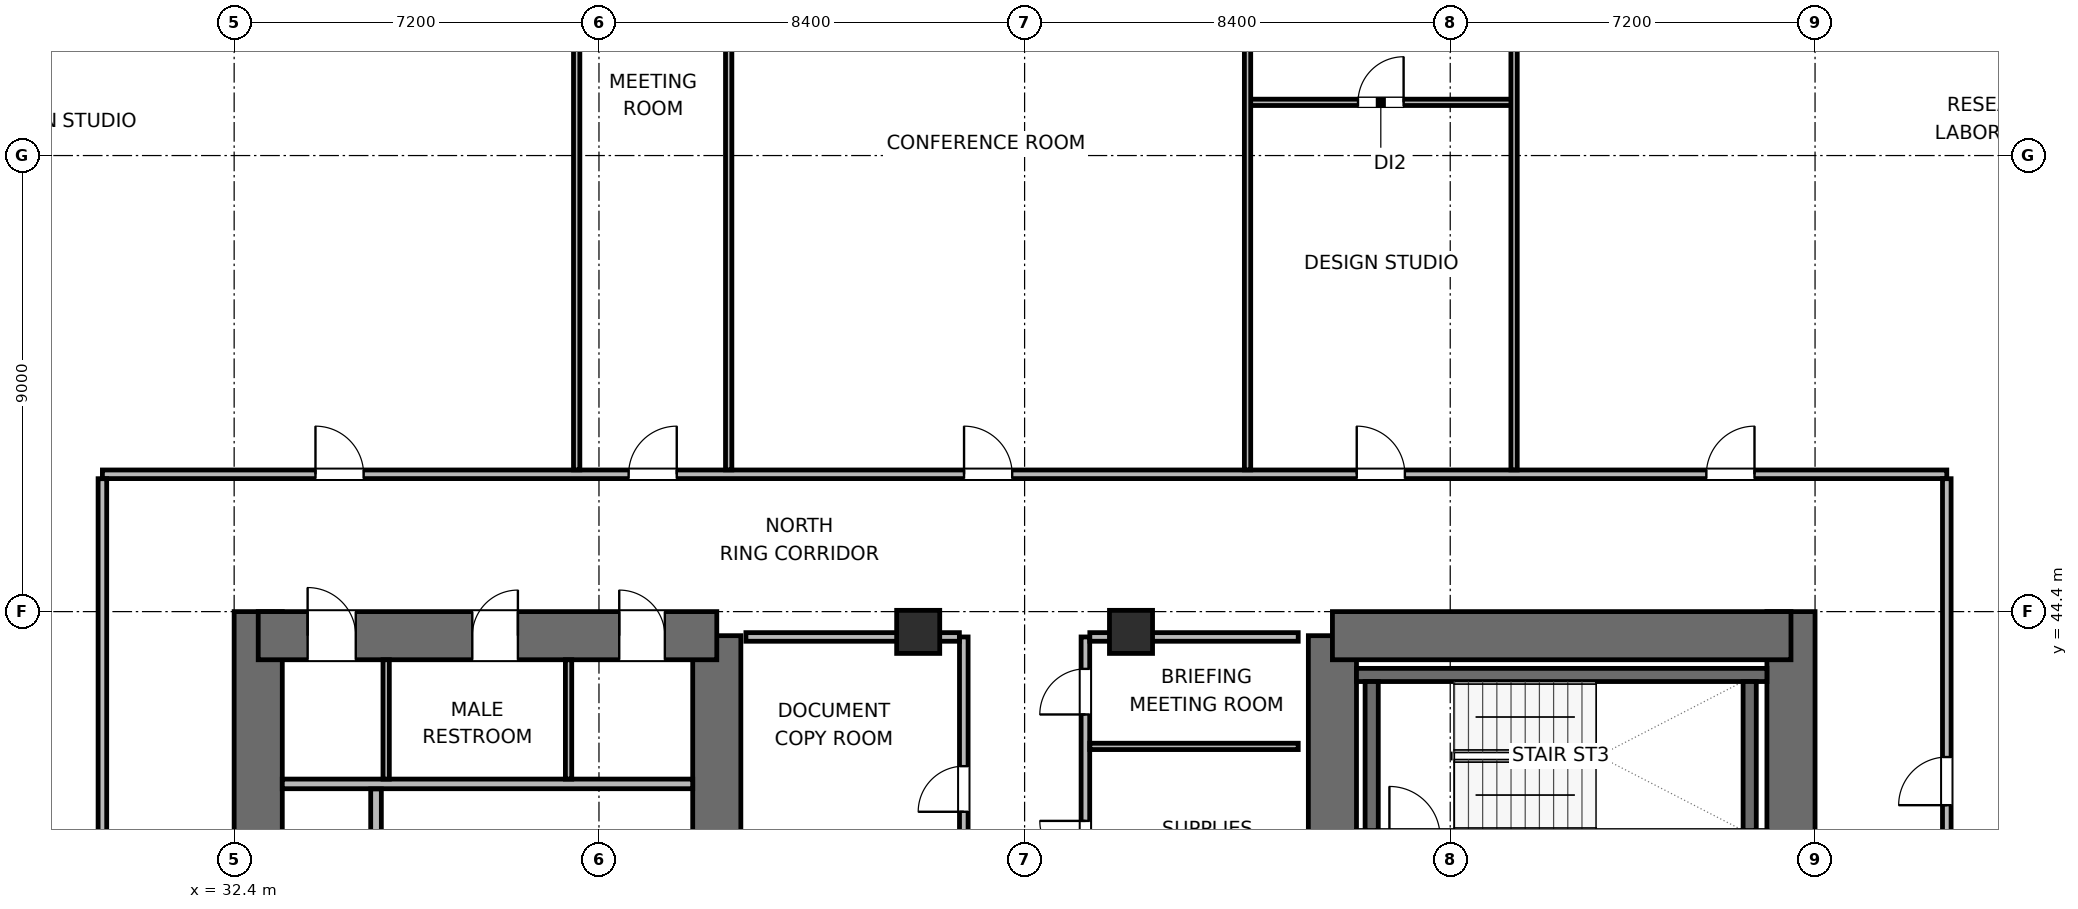
"""IFC4 building model, lengths in metres.
Left out: names, types, materials, properties, quantities, classifications, styles, units other than length and angle.
Written with IfcOpenShell. Run it as: python <this file> out.ifc"""

import sys

from ifc_helpers import new_model, si_unit, direction, frame, frame_2d, origin, origin_2d, place, context, subcontext, project, spatial, rectangle, extrude, element, fill, save


model = new_model("IFC4")
c1 = context("Model", 3, precision=1e-05, world=origin(), true_north=direction((0.0, 1.0)))
c2 = subcontext(c1, "Body", "Model", "MODEL_VIEW")
j1 = project(units=[si_unit("LENGTHUNIT", "METRE"), si_unit("PLANEANGLEUNIT", "RADIAN")], contexts=[c1])
p1 = place(None, origin())
s1 = spatial("IfcSite", under=j1, at=p1, CompositionType="ELEMENT")
p2 = place(p1, origin())
s2 = spatial("IfcBuilding", under=s1, at=p2, CompositionType="ELEMENT")
p3 = place(p2, frame((0.0, 0.0, 48.9)))
s3 = spatial("IfcBuildingStorey", under=s2, at=p3, CompositionType="ELEMENT", Elevation=48.9)
p4 = place(p3, frame((32.875, 27.6, 0.0), z_axis=(0.0, 0.0, 1.0), x_axis=(0.0, 1.0, 0.0)))
e1 = element("IfcWall", 1, at=p4, inside=s3, PredefinedType="SHEAR", context=c2, shape_type="SweptSolid", body=[
    extrude(rectangle(XDim=16.8, YDim=0.95, at=frame_2d((8.4, 0.0))), origin(), (0.0, 0.0, 1.0), 3.9),
])
p5 = place(p3, frame((41.925, 37.8, 0.0), z_axis=(0.0, 0.0, 1.0), x_axis=(0.0, 1.0, 0.0)))
e2 = element("IfcWall", 2, at=p5, inside=s3, PredefinedType="SHEAR", context=c2, shape_type="SweptSolid", body=[
    extrude(rectangle(XDim=6.125, YDim=0.95, at=frame_2d((3.062, 0.0))), origin(), (0.0, 0.0, 1.0), 3.9),
])
p6 = place(p3, frame((32.875, 43.925, 0.0), z_axis=(0.0, 0.0, 1.0), x_axis=(1.0, 0.0, 0.0)))
e3 = element("IfcWall", 3, at=p6, inside=s3, PredefinedType="SHEAR", context=c2, shape_type="SweptSolid", body=[
    extrude(rectangle(XDim=9.05, YDim=0.95, at=frame_2d((4.525, 0.0))), origin(), (0.0, 0.0, 1.0), 3.9),
])
p7 = place(p6, frame((0.975, 0.0, 0.0)))
e4 = element("IfcOpeningElement", 4, at=p7, cuts=e3, PredefinedType="OPENING", context=c2, shape_type="SweptSolid", body=[
    extrude(rectangle(XDim=0.95, YDim=2.04, at=frame_2d((0.475, 1.02))), frame((0.0, 0.485, 0.0), z_axis=(0.0, -1.0, 0.0), x_axis=(1.0, 0.0, 0.0)), (0.0, 0.0, 1.0), 0.97),
])
p8 = place(p6, frame((4.225, 0.0, 0.0)))
e5 = element("IfcOpeningElement", 5, at=p8, cuts=e3, PredefinedType="OPENING", context=c2, shape_type="SweptSolid", body=[
    extrude(rectangle(XDim=0.9, YDim=2.02, at=frame_2d((0.45, 1.01))), frame((0.0, 0.485, 0.0), z_axis=(0.0, -1.0, 0.0), x_axis=(1.0, 0.0, 0.0)), (0.0, 0.0, 1.0), 0.97),
])
p9 = place(p6, frame((7.125, 0.0, 0.0)))
e6 = element("IfcOpeningElement", 6, at=p9, cuts=e3, PredefinedType="OPENING", context=c2, shape_type="SweptSolid", body=[
    extrude(rectangle(XDim=0.9, YDim=2.02, at=frame_2d((0.45, 1.01))), frame((0.0, 0.485, 0.0), z_axis=(0.0, -1.0, 0.0), x_axis=(1.0, 0.0, 0.0)), (0.0, 0.0, 1.0), 0.97),
])
p10 = place(p3, frame((54.075, 38.0, 0.0), z_axis=(0.0, 0.0, 1.0), x_axis=(0.0, 1.0, 0.0)))
e7 = element("IfcWall", 7, at=p10, inside=s3, PredefinedType="SHEAR", context=c2, shape_type="SweptSolid", body=[
    extrude(rectangle(XDim=5.925, YDim=0.95, at=frame_2d((2.962, 0.0))), origin(), (0.0, 0.0, 1.0), 3.9),
])
p11 = place(p3, frame((63.125, 27.6, 0.0), z_axis=(0.0, 0.0, 1.0), x_axis=(0.0, 1.0, 0.0)))
e8 = element("IfcWall", 8, at=p11, inside=s3, PredefinedType="SHEAR", context=c2, shape_type="SweptSolid", body=[
    extrude(rectangle(XDim=16.8, YDim=0.95, at=frame_2d((8.4, 0.0))), origin(), (0.0, 0.0, 1.0), 3.9),
])
p12 = place(p3, frame((54.075, 43.925, 0.0), z_axis=(0.0, 0.0, 1.0), x_axis=(1.0, 0.0, 0.0)))
e9 = element("IfcWall", 9, at=p12, inside=s3, PredefinedType="SHEAR", context=c2, shape_type="SweptSolid", body=[
    extrude(rectangle(XDim=9.05, YDim=0.95, at=frame_2d((4.525, 0.0))), origin(), (0.0, 0.0, 1.0), 3.9),
])
p13 = place(p3, frame((54.55, 43.15, 0.0), z_axis=(0.0, 0.0, 1.0), x_axis=(1.0, 0.0, 0.0)))
e10 = element("IfcWall", 10, at=p13, inside=s3, PredefinedType="SHEAR", context=c2, shape_type="SweptSolid", body=[
    extrude(rectangle(XDim=8.1, YDim=0.26, at=frame_2d((4.05, 0.0))), origin(), (0.0, 0.0, 1.0), 3.9),
])
for number, where, z_axis, x_axis in (
    (11, (54.85, 40.08, 0.0), (0.0, 0.0, 1.0), (0.0, 1.0, 0.0)),
    (12, (62.31, 40.08, 0.0), (0.0, 0.0, 1.0), (0.0, 1.0, 0.0)),
):
    element("IfcWall", number, at=place(p3, frame(where, z_axis=z_axis, x_axis=x_axis)), inside=s3, PredefinedType="SHEAR", context=c2, shape_type="SweptSolid", body=[
        extrude(rectangle(XDim=2.94, YDim=0.26, at=frame_2d((1.47, 0.0))), origin(), (0.0, 0.0, 1.0), 3.9),
    ])
for number, where, z_axis, x_axis in (
    (13, (45.9, 44.0, 0.0), (0.0, 0.0, 1.0), (1.0, 0.0, 0.0)),
    (14, (50.1, 44.0, 0.0), (0.0, 0.0, 1.0), (1.0, 0.0, 0.0)),
):
    element("IfcColumn", number, at=place(p3, frame(where, z_axis=z_axis, x_axis=x_axis)), inside=s3, PredefinedType="COLUMN", context=c2, shape_type="SweptSolid", body=[
        extrude(rectangle(XDim=0.85, YDim=0.85, at=origin_2d()), origin(), (0.0, 0.0, 1.0), 3.9),
    ])
p14 = place(p3, frame((33.35, 41.0, 0.0), z_axis=(0.0, 0.0, 1.0), x_axis=(1.0, 0.0, 0.0)))
e15 = element("IfcWall", 15, at=p14, inside=s3, PredefinedType="PLUMBINGWALL", context=c2, shape_type="SweptSolid", body=[
    extrude(rectangle(XDim=8.1, YDim=0.19, at=frame_2d((4.05, 0.0))), origin(), (0.0, 0.0, 1.0), 3.64),
])
for number, where, z_axis, x_axis in (
    (16, (35.4, 41.095, 0.0), (0.0, 0.0, 1.0), (0.0, 1.0, 0.0)),
    (17, (39.0, 41.095, 0.0), (0.0, 0.0, 1.0), (0.0, 1.0, 0.0)),
):
    element("IfcWall", number, at=place(p3, frame(where, z_axis=z_axis, x_axis=x_axis)), inside=s3, PredefinedType="PARTITIONING", context=c2, shape_type="SweptSolid", body=[
        extrude(rectangle(XDim=2.355, YDim=0.125, at=frame_2d((1.177, 0.0))), origin(), (0.0, 0.0, 1.0), 3.64),
    ])
p15 = place(p3, frame((35.2, 39.58, 0.0), z_axis=(0.0, 0.0, 1.0), x_axis=(0.0, 1.0, 0.0)))
e18 = element("IfcWall", 18, at=p15, inside=s3, PredefinedType="PARTITIONING", context=c2, shape_type="SweptSolid", body=[
    extrude(rectangle(XDim=1.32, YDim=0.21, at=frame_2d((0.66, 0.0))), origin(), (0.0, 0.0, 1.0), 3.64),
])
p16 = place(p3, frame((46.8, 37.9, 0.0), z_axis=(0.0, 0.0, 1.0), x_axis=(0.0, 1.0, 0.0)))
e19 = element("IfcWall", 19, at=p16, inside=s3, PredefinedType="PARTITIONING", context=c2, shape_type="SweptSolid", body=[
    extrude(rectangle(XDim=6.0, YDim=0.17, at=frame_2d((3.0, 0.0))), origin(), (0.0, 0.0, 1.0), 3.64),
])
p17 = place(p16, frame((2.55, 0.0, 0.0)))
e20 = element("IfcOpeningElement", 20, at=p17, cuts=e19, PredefinedType="OPENING", context=c2, shape_type="SweptSolid", body=[
    extrude(rectangle(XDim=0.9, YDim=2.02, at=frame_2d((0.45, 1.01))), frame((0.0, 0.095, 0.0), z_axis=(0.0, -1.0, 0.0), x_axis=(1.0, 0.0, 0.0)), (0.0, 0.0, 1.0), 0.19),
])
p18 = place(p3, frame((42.5, 43.9, 0.0), z_axis=(0.0, 0.0, 1.0), x_axis=(1.0, 0.0, 0.0)))
e21 = element("IfcWall", 21, at=p18, inside=s3, PredefinedType="PARTITIONING", context=c2, shape_type="SweptSolid", body=[
    extrude(rectangle(XDim=4.213, YDim=0.17, at=frame_2d((2.106, 0.0))), origin(), (0.0, 0.0, 1.0), 2.525),
])
p19 = place(p3, frame((49.2, 37.9, 0.0), z_axis=(0.0, 0.0, 1.0), x_axis=(0.0, 1.0, 0.0)))
e22 = element("IfcWall", 22, at=p19, inside=s3, PredefinedType="PARTITIONING", context=c2, shape_type="SweptSolid", body=[
    extrude(rectangle(XDim=6.0, YDim=0.17, at=frame_2d((3.0, 0.0))), origin(), (0.0, 0.0, 1.0), 3.64),
])
p20 = place(p19, frame((1.47, 0.0, 0.0)))
e23 = element("IfcOpeningElement", 23, at=p20, cuts=e22, PredefinedType="OPENING", context=c2, shape_type="SweptSolid", body=[
    extrude(rectangle(XDim=0.9, YDim=2.02, at=frame_2d((0.45, 1.01))), frame((0.0, 0.095, 0.0), z_axis=(0.0, -1.0, 0.0), x_axis=(1.0, 0.0, 0.0)), (0.0, 0.0, 1.0), 0.19),
])
p21 = place(p19, frame((4.47, 0.0, 0.0)))
e24 = element("IfcOpeningElement", 24, at=p21, cuts=e22, PredefinedType="OPENING", context=c2, shape_type="SweptSolid", body=[
    extrude(rectangle(XDim=0.9, YDim=2.02, at=frame_2d((0.45, 1.01))), frame((0.0, 0.095, 0.0), z_axis=(0.0, -1.0, 0.0), x_axis=(1.0, 0.0, 0.0)), (0.0, 0.0, 1.0), 0.19),
])
p22 = place(p3, frame((49.287, 43.9, 0.0), z_axis=(0.0, 0.0, 1.0), x_axis=(1.0, 0.0, 0.0)))
e25 = element("IfcWall", 25, at=p22, inside=s3, PredefinedType="PARTITIONING", context=c2, shape_type="SweptSolid", body=[
    extrude(rectangle(XDim=4.113, YDim=0.17, at=frame_2d((2.056, 0.0))), origin(), (0.0, 0.0, 1.0), 2.525),
])
p23 = place(p3, frame((49.287, 41.74, 0.0), z_axis=(0.0, 0.0, 1.0), x_axis=(1.0, 0.0, 0.0)))
e26 = element("IfcWall", 26, at=p23, inside=s3, PredefinedType="PARTITIONING", context=c2, shape_type="SweptSolid", body=[
    extrude(rectangle(XDim=4.113, YDim=0.125, at=frame_2d((2.056, 0.0))), origin(), (0.0, 0.0, 1.0), 3.64),
])
p24 = place(p3, frame((29.8, 47.11, 0.0), z_axis=(0.0, 0.0, 1.0), x_axis=(1.0, 0.0, 0.0)))
e27 = element("IfcWall", 27, at=p24, inside=s3, PredefinedType="PARTITIONING", context=c2, shape_type="SweptSolid", body=[
    extrude(rectangle(XDim=36.4, YDim=0.17, at=frame_2d((18.2, 0.0))), origin(), (0.0, 0.0, 1.0), 3.64),
])
p25 = place(p24, frame((4.205, 0.0, 0.0)))
e28 = element("IfcOpeningElement", 28, at=p25, cuts=e27, PredefinedType="OPENING", context=c2, shape_type="SweptSolid", body=[
    extrude(rectangle(XDim=0.95, YDim=2.04, at=frame_2d((0.475, 1.02))), frame((0.0, 0.095, 0.0), z_axis=(0.0, -1.0, 0.0), x_axis=(1.0, 0.0, 0.0)), (0.0, 0.0, 1.0), 0.19),
])
p26 = place(p24, frame((10.385, 0.0, 0.0)))
e29 = element("IfcOpeningElement", 29, at=p26, cuts=e27, PredefinedType="OPENING", context=c2, shape_type="SweptSolid", body=[
    extrude(rectangle(XDim=0.95, YDim=2.04, at=frame_2d((0.475, 1.02))), frame((0.0, 0.095, 0.0), z_axis=(0.0, -1.0, 0.0), x_axis=(1.0, 0.0, 0.0)), (0.0, 0.0, 1.0), 0.19),
])
p27 = place(p24, frame((17.005, 0.0, 0.0)))
e30 = element("IfcOpeningElement", 30, at=p27, cuts=e27, PredefinedType="OPENING", context=c2, shape_type="SweptSolid", body=[
    extrude(rectangle(XDim=0.95, YDim=2.04, at=frame_2d((0.475, 1.02))), frame((0.0, 0.095, 0.0), z_axis=(0.0, -1.0, 0.0), x_axis=(1.0, 0.0, 0.0)), (0.0, 0.0, 1.0), 0.19),
])
p28 = place(p24, frame((24.755, 0.0, 0.0)))
e31 = element("IfcOpeningElement", 31, at=p28, cuts=e27, PredefinedType="OPENING", context=c2, shape_type="SweptSolid", body=[
    extrude(rectangle(XDim=0.95, YDim=2.04, at=frame_2d((0.475, 1.02))), frame((0.0, 0.095, 0.0), z_axis=(0.0, -1.0, 0.0), x_axis=(1.0, 0.0, 0.0)), (0.0, 0.0, 1.0), 0.19),
])
p29 = place(p24, frame((31.655, 0.0, 0.0)))
e32 = element("IfcOpeningElement", 32, at=p29, cuts=e27, PredefinedType="OPENING", context=c2, shape_type="SweptSolid", body=[
    extrude(rectangle(XDim=0.95, YDim=2.04, at=frame_2d((0.475, 1.02))), frame((0.0, 0.095, 0.0), z_axis=(0.0, -1.0, 0.0), x_axis=(1.0, 0.0, 0.0)), (0.0, 0.0, 1.0), 0.19),
])
p30 = place(p3, frame((29.8, 24.977, 0.0), z_axis=(0.0, 0.0, 1.0), x_axis=(0.0, 1.0, 0.0)))
e33 = element("IfcWall", 33, at=p30, inside=s3, PredefinedType="PARTITIONING", context=c2, shape_type="SweptSolid", body=[
    extrude(rectangle(XDim=22.046, YDim=0.17, at=frame_2d((11.023, 0.0))), origin(), (0.0, 0.0, 1.0), 3.64),
])
p31 = place(p30, frame((10.548, 0.0, 0.0)))
e34 = element("IfcOpeningElement", 34, at=p31, cuts=e33, PredefinedType="OPENING", context=c2, shape_type="SweptSolid", body=[
    extrude(rectangle(XDim=0.95, YDim=2.04, at=frame_2d((0.475, 1.02))), frame((0.0, 0.095, 0.0), z_axis=(0.0, -1.0, 0.0), x_axis=(1.0, 0.0, 0.0)), (0.0, 0.0, 1.0), 0.19),
])
p32 = place(p3, frame((66.2, 24.977, 0.0), z_axis=(0.0, 0.0, 1.0), x_axis=(0.0, 1.0, 0.0)))
e35 = element("IfcWall", 35, at=p32, inside=s3, PredefinedType="PARTITIONING", context=c2, shape_type="SweptSolid", body=[
    extrude(rectangle(XDim=22.046, YDim=0.17, at=frame_2d((11.023, 0.0))), origin(), (0.0, 0.0, 1.0), 3.64),
])
p33 = place(p32, frame((4.493, 0.0, 0.0)))
e36 = element("IfcOpeningElement", 36, at=p33, cuts=e35, PredefinedType="OPENING", context=c2, shape_type="SweptSolid", body=[
    extrude(rectangle(XDim=0.95, YDim=2.04, at=frame_2d((0.475, 1.02))), frame((0.0, 0.095, 0.0), z_axis=(0.0, -1.0, 0.0), x_axis=(1.0, 0.0, 0.0)), (0.0, 0.0, 1.0), 0.19),
])
p34 = place(p32, frame((15.603, 0.0, 0.0)))
e37 = element("IfcOpeningElement", 37, at=p34, cuts=e35, PredefinedType="OPENING", context=c2, shape_type="SweptSolid", body=[
    extrude(rectangle(XDim=0.95, YDim=2.04, at=frame_2d((0.475, 1.02))), frame((0.0, 0.095, 0.0), z_axis=(0.0, -1.0, 0.0), x_axis=(1.0, 0.0, 0.0)), (0.0, 0.0, 1.0), 0.19),
])
p35 = place(p3, frame((39.16, 47.197, 0.0), z_axis=(0.0, 0.0, 1.0), x_axis=(0.0, 1.0, 0.0)))
e38 = element("IfcWall", 38, at=p35, inside=s3, PredefinedType="PARTITIONING", context=c2, shape_type="SweptSolid", body=[
    extrude(rectangle(XDim=14.958, YDim=0.125, at=frame_2d((7.479, 0.0))), origin(), (0.0, 0.0, 1.0), 3.64),
])
p36 = place(p3, frame((42.16, 47.197, 0.0), z_axis=(0.0, 0.0, 1.0), x_axis=(0.0, 1.0, 0.0)))
e39 = element("IfcWall", 39, at=p36, inside=s3, PredefinedType="PARTITIONING", context=c2, shape_type="SweptSolid", body=[
    extrude(rectangle(XDim=14.393, YDim=0.125, at=frame_2d((7.197, 0.0))), origin(), (0.0, 0.0, 1.0), 3.003),
])
p37 = place(p3, frame((52.4, 54.45, 0.0), z_axis=(0.0, 0.0, 1.0), x_axis=(1.0, 0.0, 0.0)))
e40 = element("IfcWall", 40, at=p37, inside=s3, PredefinedType="PARTITIONING", context=c2, shape_type="SweptSolid", body=[
    extrude(rectangle(XDim=5.26, YDim=0.125, at=frame_2d((2.63, 0.0))), origin(), (0.0, 0.0, 1.0), 3.64),
])
p38 = place(p37, frame((2.18, 0.0, 0.0)))
e41 = element("IfcOpeningElement", 41, at=p38, cuts=e40, PredefinedType="OPENING", context=c2, shape_type="SweptSolid", body=[
    extrude(rectangle(XDim=0.9, YDim=2.02, at=frame_2d((0.45, 1.01))), frame((0.0, 0.073, 0.0), z_axis=(0.0, -1.0, 0.0), x_axis=(1.0, 0.0, 0.0)), (0.0, 0.0, 1.0), 0.145),
])
p39 = place(p3, frame((52.4, 47.197, 0.0), z_axis=(0.0, 0.0, 1.0), x_axis=(0.0, 1.0, 0.0)))
e42 = element("IfcWall", 42, at=p39, inside=s3, PredefinedType="PARTITIONING", context=c2, shape_type="SweptSolid", body=[
    extrude(rectangle(XDim=11.228, YDim=0.125, at=frame_2d((5.614, 0.0))), origin(), (0.0, 0.0, 1.0), 3.003),
])
p40 = place(p3, frame((57.66, 47.197, 0.0), z_axis=(0.0, 0.0, 1.0), x_axis=(0.0, 1.0, 0.0)))
e43 = element("IfcWall", 43, at=p40, inside=s3, PredefinedType="PARTITIONING", context=c2, shape_type="SweptSolid", body=[
    extrude(rectangle(XDim=14.888, YDim=0.125, at=frame_2d((7.444, 0.0))), origin(), (0.0, 0.0, 1.0), 3.64),
])
p41 = place(p7, origin())
e44 = element("IfcDoor", 44, at=p41, inside=s3, OperationType="SINGLE_SWING_LEFT", PredefinedType="DOOR", context=c2, shape_type="SweptSolid", body=[
    extrude(rectangle(XDim=0.95, YDim=2.04, at=frame_2d((0.475, 1.02))), frame((0.0, 0.025, 0.0), z_axis=(0.0, -1.0, 0.0), x_axis=(1.0, 0.0, 0.0)), (0.0, 0.0, 1.0), 0.05),
])
fill(e4, e44)
p42 = place(p8, origin())
e45 = element("IfcDoor", 45, at=p42, inside=s3, OperationType="SINGLE_SWING_RIGHT", PredefinedType="DOOR", context=c2, shape_type="SweptSolid", body=[
    extrude(rectangle(XDim=0.9, YDim=2.02, at=frame_2d((0.45, 1.01))), frame((0.0, 0.025, 0.0), z_axis=(0.0, -1.0, 0.0), x_axis=(1.0, 0.0, 0.0)), (0.0, 0.0, 1.0), 0.05),
])
fill(e5, e45)
p43 = place(p9, origin())
e46 = element("IfcDoor", 46, at=p43, inside=s3, OperationType="SINGLE_SWING_LEFT", PredefinedType="DOOR", context=c2, shape_type="SweptSolid", body=[
    extrude(rectangle(XDim=0.9, YDim=2.02, at=frame_2d((0.45, 1.01))), frame((0.0, 0.025, 0.0), z_axis=(0.0, -1.0, 0.0), x_axis=(1.0, 0.0, 0.0)), (0.0, 0.0, 1.0), 0.05),
])
fill(e6, e46)
p44 = place(p17, origin())
e47 = element("IfcDoor", 47, at=p44, inside=s3, OperationType="SINGLE_SWING_LEFT", PredefinedType="DOOR", context=c2, shape_type="SweptSolid", body=[
    extrude(rectangle(XDim=0.9, YDim=2.02, at=frame_2d((0.45, 1.01))), frame((0.0, 0.025, 0.0), z_axis=(0.0, -1.0, 0.0), x_axis=(1.0, 0.0, 0.0)), (0.0, 0.0, 1.0), 0.05),
])
fill(e20, e47)
p45 = place(p20, origin())
e48 = element("IfcDoor", 48, at=p45, inside=s3, OperationType="SINGLE_SWING_RIGHT", PredefinedType="DOOR", context=c2, shape_type="SweptSolid", body=[
    extrude(rectangle(XDim=0.9, YDim=2.02, at=frame_2d((0.45, 1.01))), frame((0.0, 0.025, 0.0), z_axis=(0.0, -1.0, 0.0), x_axis=(1.0, 0.0, 0.0)), (0.0, 0.0, 1.0), 0.05),
])
fill(e23, e48)
p46 = place(p21, origin())
e49 = element("IfcDoor", 49, at=p46, inside=s3, OperationType="SINGLE_SWING_LEFT", PredefinedType="DOOR", context=c2, shape_type="SweptSolid", body=[
    extrude(rectangle(XDim=0.9, YDim=2.02, at=frame_2d((0.45, 1.01))), frame((0.0, 0.025, 0.0), z_axis=(0.0, -1.0, 0.0), x_axis=(1.0, 0.0, 0.0)), (0.0, 0.0, 1.0), 0.05),
])
fill(e24, e49)
p47 = place(p25, origin())
e50 = element("IfcDoor", 50, at=p47, inside=s3, OperationType="SINGLE_SWING_LEFT", PredefinedType="DOOR", context=c2, shape_type="SweptSolid", body=[
    extrude(rectangle(XDim=0.95, YDim=2.04, at=frame_2d((0.475, 1.02))), frame((0.0, 0.025, 0.0), z_axis=(0.0, -1.0, 0.0), x_axis=(1.0, 0.0, 0.0)), (0.0, 0.0, 1.0), 0.05),
])
fill(e28, e50)
p48 = place(p26, origin())
e51 = element("IfcDoor", 51, at=p48, inside=s3, OperationType="SINGLE_SWING_RIGHT", PredefinedType="DOOR", context=c2, shape_type="SweptSolid", body=[
    extrude(rectangle(XDim=0.95, YDim=2.04, at=frame_2d((0.475, 1.02))), frame((0.0, 0.025, 0.0), z_axis=(0.0, -1.0, 0.0), x_axis=(1.0, 0.0, 0.0)), (0.0, 0.0, 1.0), 0.05),
])
fill(e29, e51)
p49 = place(p27, origin())
e52 = element("IfcDoor", 52, at=p49, inside=s3, OperationType="SINGLE_SWING_LEFT", PredefinedType="DOOR", context=c2, shape_type="SweptSolid", body=[
    extrude(rectangle(XDim=0.95, YDim=2.04, at=frame_2d((0.475, 1.02))), frame((0.0, 0.025, 0.0), z_axis=(0.0, -1.0, 0.0), x_axis=(1.0, 0.0, 0.0)), (0.0, 0.0, 1.0), 0.05),
])
fill(e30, e52)
p50 = place(p38, origin())
e53 = element("IfcDoor", 53, at=p50, inside=s3, OperationType="SINGLE_SWING_RIGHT", PredefinedType="DOOR", context=c2, shape_type="SweptSolid", body=[
    extrude(rectangle(XDim=0.9, YDim=2.02, at=frame_2d((0.45, 1.01))), frame((0.0, 0.025, 0.0), z_axis=(0.0, -1.0, 0.0), x_axis=(1.0, 0.0, 0.0)), (0.0, 0.0, 1.0), 0.05),
])
fill(e41, e53)
p51 = place(p28, origin())
e54 = element("IfcDoor", 54, at=p51, inside=s3, OperationType="SINGLE_SWING_LEFT", PredefinedType="DOOR", context=c2, shape_type="SweptSolid", body=[
    extrude(rectangle(XDim=0.95, YDim=2.04, at=frame_2d((0.475, 1.02))), frame((0.0, 0.025, 0.0), z_axis=(0.0, -1.0, 0.0), x_axis=(1.0, 0.0, 0.0)), (0.0, 0.0, 1.0), 0.05),
])
fill(e31, e54)
p52 = place(p29, origin())
e55 = element("IfcDoor", 55, at=p52, inside=s3, OperationType="SINGLE_SWING_RIGHT", PredefinedType="DOOR", context=c2, shape_type="SweptSolid", body=[
    extrude(rectangle(XDim=0.95, YDim=2.04, at=frame_2d((0.475, 1.02))), frame((0.0, 0.025, 0.0), z_axis=(0.0, -1.0, 0.0), x_axis=(1.0, 0.0, 0.0)), (0.0, 0.0, 1.0), 0.05),
])
fill(e32, e55)
p53 = place(p34, origin())
e56 = element("IfcDoor", 56, at=p53, inside=s3, OperationType="SINGLE_SWING_LEFT", PredefinedType="DOOR", context=c2, shape_type="SweptSolid", body=[
    extrude(rectangle(XDim=0.95, YDim=2.04, at=frame_2d((0.475, 1.02))), frame((0.0, 0.025, 0.0), z_axis=(0.0, -1.0, 0.0), x_axis=(1.0, 0.0, 0.0)), (0.0, 0.0, 1.0), 0.05),
])
fill(e37, e56)
save(model, sys.argv[1])
